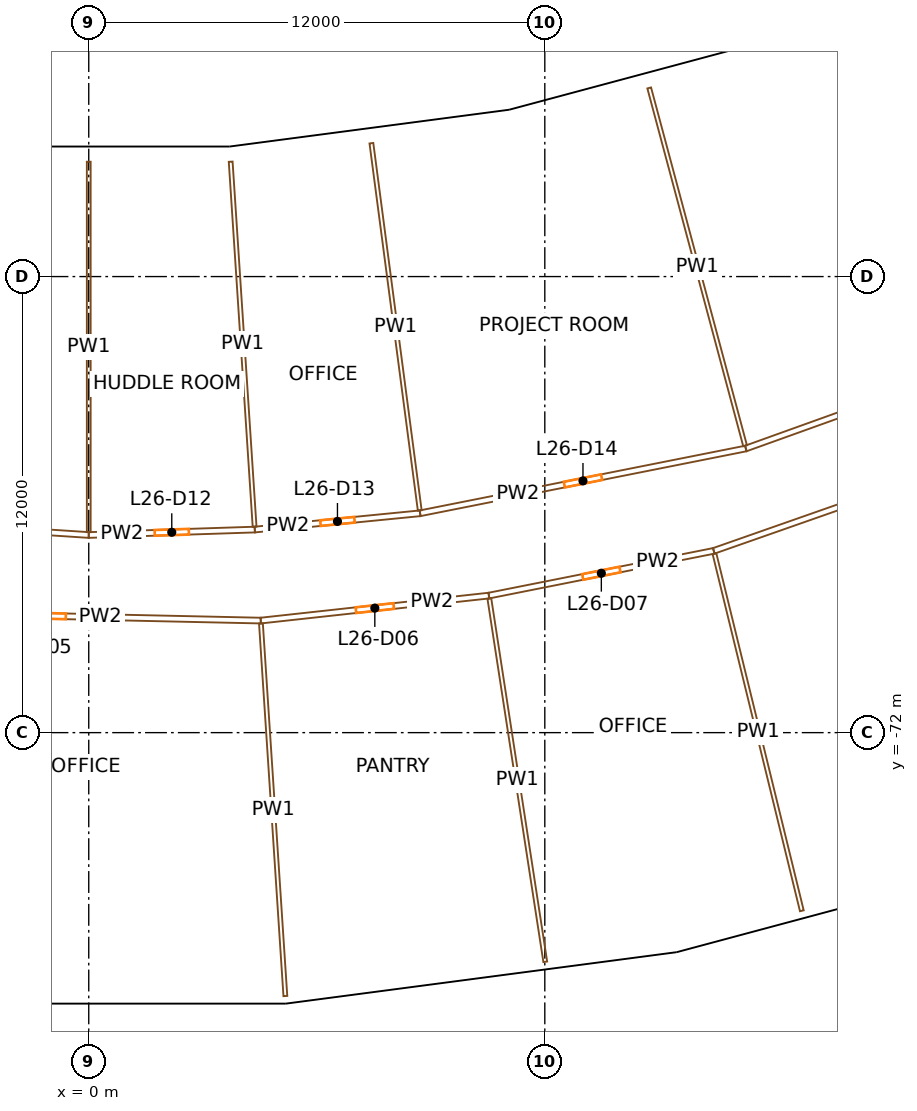
"""IFC4 building model, lengths in metres.
Left out: names, types, materials, properties, quantities, classifications, styles, units other than length and angle.
Written with IfcOpenShell. Run it as: python <this file> out.ifc"""

import sys

from ifc_helpers import new_model, si_unit, direction, frame, frame_2d, origin, origin_2d, place, context, subcontext, project, spatial, rectangle, extrude, element, fill, save


model = new_model("IFC4")
c1 = context("Model", 3, precision=1e-05, world=origin(), true_north=direction((0.0, 1.0)))
c2 = subcontext(c1, "Body", "Model", "MODEL_VIEW")
j1 = project(units=[si_unit("LENGTHUNIT", "METRE"), si_unit("PLANEANGLEUNIT", "RADIAN")], contexts=[c1])
p1 = place(None, origin())
s1 = spatial("IfcSite", under=j1, at=p1, CompositionType="ELEMENT")
p2 = place(p1, origin())
s2 = spatial("IfcBuilding", under=s1, at=p2, CompositionType="ELEMENT")
p3 = place(p2, frame((0.0, 0.0, 117.7)))
s3 = spatial("IfcBuildingStorey", under=s2, at=p3, CompositionType="ELEMENT", Elevation=117.7)
for number, where, z_axis, x_axis in (
    (1, (3.81, -58.125, 0.0), (0.0, 0.0, 1.0), (0.998, 0.065, 0.0)),
    (2, (5.085, -77.583, 0.0), (0.0, 0.0, 1.0), (0.998, 0.065, 0.0)),
    (3, (11.364, -57.131, 0.0), (0.0, 0.0, 1.0), (0.981, 0.195, 0.0)),
    (4, (15.168, -76.256, 0.0), (0.0, 0.0, 1.0), (0.981, 0.195, 0.0)),
    (5, (18.724, -55.159, 0.0), (0.0, 0.0, 1.0), (0.947, 0.321, 0.0)),
):
    element("IfcColumn", number, at=place(p3, frame(where, z_axis=z_axis, x_axis=x_axis)), inside=s3, PredefinedType="COLUMN", context=c2, shape_type="SweptSolid", body=[
        extrude(rectangle(XDim=1.2, YDim=1.5, at=origin_2d()), origin(), (0.0, 0.0, 1.0), 3.8),
    ])
p4 = place(p3, frame((11.125, -55.804, 0.0), z_axis=(0.0, 0.0, 1.0), x_axis=(-0.991444533306, -0.130528684121, 0.0)))
e6 = element("IfcWall", 6, at=p4, inside=s3, PredefinedType="SOLIDWALL", context=c2, shape_type="SweptSolid", body=[
    extrude(rectangle(XDim=7.493, YDim=0.4, at=frame_2d((3.747, 0.0))), origin(), (0.0, 0.0, 1.0), 2.7),
])
p5 = place(p4, frame((4.301, 0.0, 0.9)))
e7 = element("IfcOpeningElement", 7, at=p5, cuts=e6, PredefinedType="OPENING", context=c2, shape_type="SweptSolid", body=[
    extrude(rectangle(XDim=2.6, YDim=1.65, at=frame_2d((1.3, 0.825))), frame((0.0, 0.21, 0.0), z_axis=(0.0, -1.0, 0.0), x_axis=(1.0, 0.0, 0.0)), (0.0, 0.0, 1.0), 0.42),
])
p6 = place(p4, frame((0.592, 0.0, 0.9)))
e8 = element("IfcOpeningElement", 8, at=p6, cuts=e6, PredefinedType="OPENING", context=c2, shape_type="SweptSolid", body=[
    extrude(rectangle(XDim=2.6, YDim=1.65, at=frame_2d((1.3, 0.825))), frame((0.0, 0.21, 0.0), z_axis=(0.0, -1.0, 0.0), x_axis=(1.0, 0.0, 0.0)), (0.0, 0.0, 1.0), 0.42),
])
p7 = place(p3, frame((18.241, -53.894, 0.0), z_axis=(0.0, 0.0, 1.0), x_axis=(-0.965924597867, -0.258823629594, 0.0)))
e9 = element("IfcWall", 9, at=p7, inside=s3, PredefinedType="SOLIDWALL", context=c2, shape_type="SweptSolid", body=[
    extrude(rectangle(XDim=7.342, YDim=0.4, at=frame_2d((3.671, 0.0))), origin(), (0.0, 0.0, 1.0), 2.7),
])
p8 = place(p7, frame((4.225, 0.0, 0.9)))
e10 = element("IfcOpeningElement", 10, at=p8, cuts=e9, PredefinedType="OPENING", context=c2, shape_type="SweptSolid", body=[
    extrude(rectangle(XDim=2.6, YDim=1.65, at=frame_2d((1.3, 0.825))), frame((0.0, 0.21, 0.0), z_axis=(0.0, -1.0, 0.0), x_axis=(1.0, 0.0, 0.0)), (0.0, 0.0, 1.0), 0.42),
])
p9 = place(p7, frame((0.517, 0.0, 0.9)))
e11 = element("IfcOpeningElement", 11, at=p9, cuts=e9, PredefinedType="OPENING", context=c2, shape_type="SweptSolid", body=[
    extrude(rectangle(XDim=2.6, YDim=1.65, at=frame_2d((1.3, 0.825))), frame((0.0, 0.21, 0.0), z_axis=(0.0, -1.0, 0.0), x_axis=(1.0, 0.0, 0.0)), (0.0, 0.0, 1.0), 0.42),
])
p10 = place(p3, frame((3.671, -56.779, 0.0), z_axis=(0.0, 0.0, 1.0), x_axis=(-1.0, 0.0, 0.0)))
e12 = element("IfcWall", 12, at=p10, inside=s3, PredefinedType="SOLIDWALL", context=c2, shape_type="SweptSolid", body=[
    extrude(rectangle(XDim=7.341, YDim=0.4, at=frame_2d((3.671, 0.0))), origin(), (0.0, 0.0, 1.0), 2.7),
])
p11 = place(p10, frame((4.225, 0.0, 0.9)))
e13 = element("IfcOpeningElement", 13, at=p11, cuts=e12, PredefinedType="OPENING", context=c2, shape_type="SweptSolid", body=[
    extrude(rectangle(XDim=2.6, YDim=1.65, at=frame_2d((1.3, 0.825))), frame((0.0, 0.21, 0.0), z_axis=(0.0, -1.0, 0.0), x_axis=(1.0, 0.0, 0.0)), (0.0, 0.0, 1.0), 0.42),
])
p12 = place(p10, frame((0.517, 0.0, 0.9)))
e14 = element("IfcOpeningElement", 14, at=p12, cuts=e12, PredefinedType="OPENING", context=c2, shape_type="SweptSolid", body=[
    extrude(rectangle(XDim=2.6, YDim=1.65, at=frame_2d((1.3, 0.825))), frame((0.0, 0.21, 0.0), z_axis=(0.0, -1.0, 0.0), x_axis=(1.0, 0.0, 0.0)), (0.0, 0.0, 1.0), 0.42),
])
p13 = place(p3, frame((-8.719, -66.229, 0.0), z_axis=(0.0, 0.0, 1.0), x_axis=(0.997858593599, -0.065408158359, 0.0)))
e15 = element("IfcWall", 15, at=p13, inside=s3, PredefinedType="PARTITIONING", context=c2, shape_type="SweptSolid", body=[
    extrude(rectangle(XDim=8.738, YDim=0.15, at=frame_2d((4.369, 0.0))), origin(), (0.0, 0.0, 1.0), 2.4),
])
p14 = place(p13, frame((3.869, 0.0, 0.0)))
e16 = element("IfcOpeningElement", 16, at=p14, cuts=e15, PredefinedType="OPENING", context=c2, shape_type="SweptSolid", body=[
    extrude(rectangle(XDim=1.0, YDim=2.1, at=frame_2d((0.5, 1.05))), frame((0.0, 0.085, 0.0), z_axis=(0.0, -1.0, 0.0), x_axis=(1.0, 0.0, 0.0)), (0.0, 0.0, 1.0), 0.17),
])
p15 = place(p3, frame((4.526, -69.052, 0.0), z_axis=(0.0, 0.0, 1.0), x_axis=(-0.999762313962, 0.02180173346, 0.0)))
e17 = element("IfcWall", 17, at=p15, inside=s3, PredefinedType="PARTITIONING", context=c2, shape_type="SweptSolid", body=[
    extrude(rectangle(XDim=12.061, YDim=0.15, at=frame_2d((6.03, 0.0))), origin(), (0.0, 0.0, 1.0), 2.4),
])
p16 = place(p15, frame((5.13, 0.0, 0.0)))
e18 = element("IfcOpeningElement", 18, at=p16, cuts=e17, PredefinedType="OPENING", context=c2, shape_type="SweptSolid", body=[
    extrude(rectangle(XDim=1.8, YDim=2.1, at=frame_2d((0.9, 1.05))), frame((0.0, 0.085, 0.0), z_axis=(0.0, -1.0, 0.0), x_axis=(1.0, 0.0, 0.0)), (0.0, 0.0, 1.0), 0.17),
])
p17 = place(p3, frame((0.0, -66.8, 0.0), z_axis=(0.0, 0.0, 1.0), x_axis=(0.99946426167, 0.03272903366, 0.0)))
e19 = element("IfcWall", 19, at=p17, inside=s3, PredefinedType="PARTITIONING", context=c2, shape_type="SweptSolid", body=[
    extrude(rectangle(XDim=4.371, YDim=0.15, at=frame_2d((2.186, 0.0))), origin(), (0.0, 0.0, 1.0), 2.4),
])
p18 = place(p17, frame((1.736, 0.0, 0.0)))
e20 = element("IfcOpeningElement", 20, at=p18, cuts=e19, PredefinedType="OPENING", context=c2, shape_type="SweptSolid", body=[
    extrude(rectangle(XDim=0.9, YDim=2.1, at=frame_2d((0.45, 1.05))), frame((0.0, 0.085, 0.0), z_axis=(0.0, -1.0, 0.0), x_axis=(1.0, 0.0, 0.0)), (0.0, 0.0, 1.0), 0.17),
])
p19 = place(p3, frame((0.0, -56.979, 0.0), z_axis=(0.0, 0.0, 1.0), x_axis=(0.0, -1.0, 0.0)))
e21 = element("IfcWall", 21, at=p19, inside=s3, PredefinedType="PARTITIONING", context=c2, shape_type="SweptSolid", body=[
    extrude(rectangle(XDim=9.747, YDim=0.1, at=frame_2d((4.873, 0.0))), origin(), (0.0, 0.0, 1.0), 2.4),
])
p20 = place(p3, frame((3.735, -56.978, 0.0), z_axis=(0.0, 0.0, 1.0), x_axis=(0.065392665599, -0.997859609006, 0.0)))
e22 = element("IfcWall", 22, at=p20, inside=s3, PredefinedType="PARTITIONING", context=c2, shape_type="SweptSolid", body=[
    extrude(rectangle(XDim=9.625, YDim=0.1, at=frame_2d((4.812, 0.0))), origin(), (0.0, 0.0, 1.0), 2.4),
])
p21 = place(p3, frame((4.369, -66.657, 0.0), z_axis=(0.0, 0.0, 1.0), x_axis=(0.995184826457, 0.098016127192, 0.0)))
e23 = element("IfcWall", 23, at=p21, inside=s3, PredefinedType="PARTITIONING", context=c2, shape_type="SweptSolid", body=[
    extrude(rectangle(XDim=4.371, YDim=0.15, at=frame_2d((2.186, 0.0))), origin(), (0.0, 0.0, 1.0), 2.4),
])
p22 = place(p21, frame((1.736, 0.0, 0.0)))
e24 = element("IfcOpeningElement", 24, at=p22, cuts=e23, PredefinedType="OPENING", context=c2, shape_type="SweptSolid", body=[
    extrude(rectangle(XDim=0.9, YDim=2.1, at=frame_2d((0.45, 1.05))), frame((0.0, 0.085, 0.0), z_axis=(0.0, -1.0, 0.0), x_axis=(1.0, 0.0, 0.0)), (0.0, 0.0, 1.0), 0.17),
])
p23 = place(p3, frame((10.529, -68.394, 0.0), z_axis=(0.0, 0.0, 1.0), x_axis=(-0.994055567966, -0.108873907782, 0.0)))
e25 = element("IfcWall", 25, at=p23, inside=s3, PredefinedType="PARTITIONING", context=c2, shape_type="SweptSolid", body=[
    extrude(rectangle(XDim=6.039, YDim=0.15, at=frame_2d((3.02, 0.0))), origin(), (0.0, 0.0, 1.0), 2.4),
])
p24 = place(p23, frame((2.52, 0.0, 0.0)))
e26 = element("IfcOpeningElement", 26, at=p24, cuts=e25, PredefinedType="OPENING", context=c2, shape_type="SweptSolid", body=[
    extrude(rectangle(XDim=1.0, YDim=2.1, at=frame_2d((0.5, 1.05))), frame((0.0, 0.085, 0.0), z_axis=(0.0, -1.0, 0.0), x_axis=(1.0, 0.0, 0.0)), (0.0, 0.0, 1.0), 0.17),
])
p25 = place(p3, frame((5.173, -78.931, 0.0), z_axis=(0.0, 0.0, 1.0), x_axis=(-0.065402415744, 0.997858970003, 0.0)))
e27 = element("IfcWall", 27, at=p25, inside=s3, PredefinedType="PARTITIONING", context=c2, shape_type="SweptSolid", body=[
    extrude(rectangle(XDim=9.825, YDim=0.1, at=frame_2d((4.913, 0.0))), origin(), (0.0, 0.0, 1.0), 2.4),
])
p26 = place(p3, frame((7.437, -56.491, 0.0), z_axis=(0.0, 0.0, 1.0), x_axis=(0.13053421433, -0.99144380521, 0.0)))
e28 = element("IfcWall", 28, at=p26, inside=s3, PredefinedType="PARTITIONING", context=c2, shape_type="SweptSolid", body=[
    extrude(rectangle(XDim=9.746, YDim=0.1, at=frame_2d((4.873, 0.0))), origin(), (0.0, 0.0, 1.0), 2.4),
])
p27 = place(p3, frame((8.719, -66.229, 0.0), z_axis=(0.0, 0.0, 1.0), x_axis=(0.980786466832, 0.195084357342, 0.0)))
e29 = element("IfcWall", 29, at=p27, inside=s3, PredefinedType="PARTITIONING", context=c2, shape_type="SweptSolid", body=[
    extrude(rectangle(XDim=8.738, YDim=0.15, at=frame_2d((4.369, 0.0))), origin(), (0.0, 0.0, 1.0), 2.4),
])
p28 = place(p27, frame((3.869, 0.0, 0.0)))
e30 = element("IfcOpeningElement", 30, at=p28, cuts=e29, PredefinedType="OPENING", context=c2, shape_type="SweptSolid", body=[
    extrude(rectangle(XDim=1.0, YDim=2.1, at=frame_2d((0.5, 1.05))), frame((0.0, 0.085, 0.0), z_axis=(0.0, -1.0, 0.0), x_axis=(1.0, 0.0, 0.0)), (0.0, 0.0, 1.0), 0.17),
])
p29 = place(p3, frame((16.446, -67.217, 0.0), z_axis=(0.0, 0.0, 1.0), x_axis=(-0.980785582749, -0.195088802015, 0.0)))
e31 = element("IfcWall", 31, at=p29, inside=s3, PredefinedType="PARTITIONING", context=c2, shape_type="SweptSolid", body=[
    extrude(rectangle(XDim=6.033, YDim=0.15, at=frame_2d((3.017, 0.0))), origin(), (0.0, 0.0, 1.0), 2.4),
])
p30 = place(p29, frame((2.517, 0.0, 0.0)))
e32 = element("IfcOpeningElement", 32, at=p30, cuts=e31, PredefinedType="OPENING", context=c2, shape_type="SweptSolid", body=[
    extrude(rectangle(XDim=1.0, YDim=2.1, at=frame_2d((0.5, 1.05))), frame((0.0, 0.085, 0.0), z_axis=(0.0, -1.0, 0.0), x_axis=(1.0, 0.0, 0.0)), (0.0, 0.0, 1.0), 0.17),
])
p31 = place(p3, frame((12.012, -78.03, 0.0), z_axis=(0.0, 0.0, 1.0), x_axis=(-0.152150105958, 0.988357397532, 0.0)))
e33 = element("IfcWall", 33, at=p31, inside=s3, PredefinedType="PARTITIONING", context=c2, shape_type="SweptSolid", body=[
    extrude(rectangle(XDim=9.674, YDim=0.1, at=frame_2d((4.837, 0.0))), origin(), (0.0, 0.0, 1.0), 2.4),
])
p32 = place(p3, frame((14.747, -55.037, 0.0), z_axis=(0.0, 0.0, 1.0), x_axis=(0.258833329344, -0.965921998725, 0.0)))
e34 = element("IfcWall", 34, at=p32, inside=s3, PredefinedType="PARTITIONING", context=c2, shape_type="SweptSolid", body=[
    extrude(rectangle(XDim=9.746, YDim=0.1, at=frame_2d((4.873, 0.0))), origin(), (0.0, 0.0, 1.0), 2.4),
])
p33 = place(p3, frame((29.057, -62.796, 0.0), z_axis=(0.0, 0.0, 1.0), x_axis=(-0.943684765834, -0.330845980378, 0.0)))
e35 = element("IfcWall", 35, at=p33, inside=s3, PredefinedType="PARTITIONING", context=c2, shape_type="SweptSolid", body=[
    extrude(rectangle(XDim=13.363, YDim=0.15, at=frame_2d((6.682, 0.0))), origin(), (0.0, 0.0, 1.0), 2.4),
])
p34 = place(p33, frame((5.782, 0.0, 0.0)))
e36 = element("IfcOpeningElement", 36, at=p34, cuts=e35, PredefinedType="OPENING", context=c2, shape_type="SweptSolid", body=[
    extrude(rectangle(XDim=1.8, YDim=2.1, at=frame_2d((0.9, 1.05))), frame((0.0, 0.085, 0.0), z_axis=(0.0, -1.0, 0.0), x_axis=(1.0, 0.0, 0.0)), (0.0, 0.0, 1.0), 0.17),
])
p35 = place(p3, frame((17.289, -64.524, 0.0), z_axis=(0.0, 0.0, 1.0), x_axis=(0.941150861554, 0.337986768669, 0.0)))
e37 = element("IfcWall", 37, at=p35, inside=s3, PredefinedType="PARTITIONING", context=c2, shape_type="SweptSolid", body=[
    extrude(rectangle(XDim=10.998, YDim=0.15, at=frame_2d((5.499, 0.0))), origin(), (0.0, 0.0, 1.0), 2.4),
])
p36 = place(p35, frame((4.999, 0.0, 0.0)))
e38 = element("IfcOpeningElement", 38, at=p36, cuts=e37, PredefinedType="OPENING", context=c2, shape_type="SweptSolid", body=[
    extrude(rectangle(XDim=1.0, YDim=2.1, at=frame_2d((0.5, 1.05))), frame((0.0, 0.085, 0.0), z_axis=(0.0, -1.0, 0.0), x_axis=(1.0, 0.0, 0.0)), (0.0, 0.0, 1.0), 0.17),
])
p37 = place(p3, frame((18.763, -76.687, 0.0), z_axis=(0.0, 0.0, 1.0), x_axis=(-0.237657357205, 0.971349051869, 0.0)))
e39 = element("IfcWall", 39, at=p37, inside=s3, PredefinedType="PARTITIONING", context=c2, shape_type="SweptSolid", body=[
    extrude(rectangle(XDim=9.674, YDim=0.1, at=frame_2d((4.837, 0.0))), origin(), (0.0, 0.0, 1.0), 2.4),
])
p38 = place(p11, origin())
e40 = element("IfcWindow", 40, at=p38, inside=s3, PartitioningType="SINGLE_PANEL", PredefinedType="WINDOW", context=c2, shape_type="SweptSolid", body=[
    extrude(rectangle(XDim=2.6, YDim=1.65, at=frame_2d((1.3, 0.825))), frame((0.0, 0.03, 0.0), z_axis=(0.0, -1.0, 0.0), x_axis=(1.0, 0.0, 0.0)), (0.0, 0.0, 1.0), 0.06),
])
fill(e13, e40)
p39 = place(p12, origin())
e41 = element("IfcWindow", 41, at=p39, inside=s3, PartitioningType="SINGLE_PANEL", PredefinedType="WINDOW", context=c2, shape_type="SweptSolid", body=[
    extrude(rectangle(XDim=2.6, YDim=1.65, at=frame_2d((1.3, 0.825))), frame((0.0, 0.03, 0.0), z_axis=(0.0, -1.0, 0.0), x_axis=(1.0, 0.0, 0.0)), (0.0, 0.0, 1.0), 0.06),
])
fill(e14, e41)
p40 = place(p5, origin())
e42 = element("IfcWindow", 42, at=p40, inside=s3, PartitioningType="SINGLE_PANEL", PredefinedType="WINDOW", context=c2, shape_type="SweptSolid", body=[
    extrude(rectangle(XDim=2.6, YDim=1.65, at=frame_2d((1.3, 0.825))), frame((0.0, 0.03, 0.0), z_axis=(0.0, -1.0, 0.0), x_axis=(1.0, 0.0, 0.0)), (0.0, 0.0, 1.0), 0.06),
])
fill(e7, e42)
p41 = place(p6, origin())
e43 = element("IfcWindow", 43, at=p41, inside=s3, PartitioningType="SINGLE_PANEL", PredefinedType="WINDOW", context=c2, shape_type="SweptSolid", body=[
    extrude(rectangle(XDim=2.6, YDim=1.65, at=frame_2d((1.3, 0.825))), frame((0.0, 0.03, 0.0), z_axis=(0.0, -1.0, 0.0), x_axis=(1.0, 0.0, 0.0)), (0.0, 0.0, 1.0), 0.06),
])
fill(e8, e43)
p42 = place(p8, origin())
e44 = element("IfcWindow", 44, at=p42, inside=s3, PartitioningType="SINGLE_PANEL", PredefinedType="WINDOW", context=c2, shape_type="SweptSolid", body=[
    extrude(rectangle(XDim=2.6, YDim=1.65, at=frame_2d((1.3, 0.825))), frame((0.0, 0.03, 0.0), z_axis=(0.0, -1.0, 0.0), x_axis=(1.0, 0.0, 0.0)), (0.0, 0.0, 1.0), 0.06),
])
fill(e10, e44)
p43 = place(p9, origin())
e45 = element("IfcWindow", 45, at=p43, inside=s3, PartitioningType="SINGLE_PANEL", PredefinedType="WINDOW", context=c2, shape_type="SweptSolid", body=[
    extrude(rectangle(XDim=2.6, YDim=1.65, at=frame_2d((1.3, 0.825))), frame((0.0, 0.03, 0.0), z_axis=(0.0, -1.0, 0.0), x_axis=(1.0, 0.0, 0.0)), (0.0, 0.0, 1.0), 0.06),
])
fill(e11, e45)
p44 = place(p16, origin())
e46 = element("IfcDoor", 46, at=p44, inside=s3, OperationType="DOUBLE_DOOR_SINGLE_SWING", PredefinedType="DOOR", context=c2, shape_type="SweptSolid", body=[
    extrude(rectangle(XDim=1.8, YDim=2.1, at=frame_2d((0.9, 1.05))), frame((0.0, 0.025, 0.0), z_axis=(0.0, -1.0, 0.0), x_axis=(1.0, 0.0, 0.0)), (0.0, 0.0, 1.0), 0.05),
])
fill(e18, e46)
p45 = place(p24, origin())
e47 = element("IfcDoor", 47, at=p45, inside=s3, OperationType="SINGLE_SWING_RIGHT", PredefinedType="DOOR", context=c2, shape_type="SweptSolid", body=[
    extrude(rectangle(XDim=1.0, YDim=2.1, at=frame_2d((0.5, 1.05))), frame((0.0, 0.025, 0.0), z_axis=(0.0, -1.0, 0.0), x_axis=(1.0, 0.0, 0.0)), (0.0, 0.0, 1.0), 0.05),
])
fill(e26, e47)
p46 = place(p30, origin())
e48 = element("IfcDoor", 48, at=p46, inside=s3, OperationType="SINGLE_SWING_RIGHT", PredefinedType="DOOR", context=c2, shape_type="SweptSolid", body=[
    extrude(rectangle(XDim=1.0, YDim=2.1, at=frame_2d((0.5, 1.05))), frame((0.0, 0.025, 0.0), z_axis=(0.0, -1.0, 0.0), x_axis=(1.0, 0.0, 0.0)), (0.0, 0.0, 1.0), 0.05),
])
fill(e32, e48)
p47 = place(p18, origin())
e49 = element("IfcDoor", 49, at=p47, inside=s3, OperationType="SINGLE_SWING_RIGHT", PredefinedType="DOOR", context=c2, shape_type="SweptSolid", body=[
    extrude(rectangle(XDim=0.9, YDim=2.1, at=frame_2d((0.45, 1.05))), frame((0.0, 0.025, 0.0), z_axis=(0.0, -1.0, 0.0), x_axis=(1.0, 0.0, 0.0)), (0.0, 0.0, 1.0), 0.05),
])
fill(e20, e49)
p48 = place(p22, origin())
e50 = element("IfcDoor", 50, at=p48, inside=s3, OperationType="SINGLE_SWING_RIGHT", PredefinedType="DOOR", context=c2, shape_type="SweptSolid", body=[
    extrude(rectangle(XDim=0.9, YDim=2.1, at=frame_2d((0.45, 1.05))), frame((0.0, 0.025, 0.0), z_axis=(0.0, -1.0, 0.0), x_axis=(1.0, 0.0, 0.0)), (0.0, 0.0, 1.0), 0.05),
])
fill(e24, e50)
p49 = place(p28, origin())
e51 = element("IfcDoor", 51, at=p49, inside=s3, OperationType="SINGLE_SWING_RIGHT", PredefinedType="DOOR", context=c2, shape_type="SweptSolid", body=[
    extrude(rectangle(XDim=1.0, YDim=2.1, at=frame_2d((0.5, 1.05))), frame((0.0, 0.025, 0.0), z_axis=(0.0, -1.0, 0.0), x_axis=(1.0, 0.0, 0.0)), (0.0, 0.0, 1.0), 0.05),
])
fill(e30, e51)
save(model, sys.argv[1])
